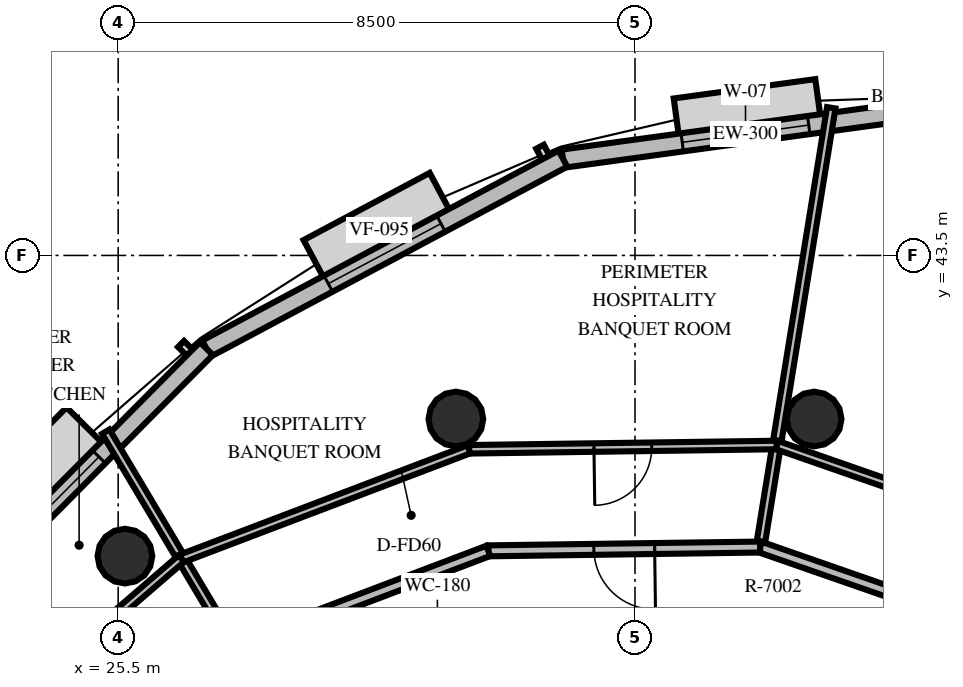
"""IFC4 building model, lengths in metres.
Left out: names, types, materials, properties, quantities, classifications, styles, units other than length and angle.
Written with IfcOpenShell. Run it as: python <this file> out.ifc"""

import sys

from ifc_helpers import new_model, si_unit, direction, frame, frame_2d, origin, origin_2d, place, context, subcontext, project, spatial, rectangle, circle, extrude, element, fill, save


model = new_model("IFC4")
c1 = context("Model", 3, precision=1e-05, world=origin(), true_north=direction((0.0, 1.0)))
c2 = subcontext(c1, "Body", "Model", "MODEL_VIEW")
j1 = project(units=[si_unit("LENGTHUNIT", "METRE"), si_unit("PLANEANGLEUNIT", "RADIAN")], contexts=[c1])
p1 = place(None, origin())
s1 = spatial("IfcSite", under=j1, at=p1, CompositionType="ELEMENT")
p2 = place(p1, origin())
s2 = spatial("IfcBuilding", under=s1, at=p2, CompositionType="ELEMENT")
p3 = place(p2, frame((0.0, 0.0, 280.8)))
s3 = spatial("IfcBuildingStorey", under=s2, at=p3, CompositionType="ELEMENT", Elevation=280.8)
for number, where, z_axis, x_axis in (
    (1, (36.946, 40.81, 0.0), (0.0, 0.0, 1.0), (1.0, 0.0, 0.0)),
    (2, (31.054, 40.81, 0.0), (0.0, 0.0, 1.0), (1.0, 0.0, 0.0)),
    (3, (25.611, 38.555, 0.0), (0.0, 0.0, 1.0), (1.0, 0.0, 0.0)),
):
    element("IfcColumn", number, at=place(p3, frame(where, z_axis=z_axis, x_axis=x_axis)), inside=s3, PredefinedType="COLUMN", context=c2, shape_type="SweptSolid", body=[
        extrude(circle(Radius=0.45, at=origin_2d()), origin(), (0.0, 0.0, 1.0), 3.6),
    ])
p4 = place(p3, frame((38.82, 45.912, 0.0), z_axis=(0.0, 0.0, 1.0), x_axis=(-0.99078452566, -0.135447494301, 0.0)))
e4 = element("IfcWall", 4, at=p4, inside=s3, PredefinedType="SOLIDWALL", context=c2, shape_type="SweptSolid", body=[
    extrude(rectangle(XDim=6.062, YDim=0.3, at=frame_2d((3.031, 0.0))), origin(), (0.0, 0.0, 1.0), 2.76),
])
p5 = place(p4, frame((1.981, 0.0, 0.8)))
e5 = element("IfcOpeningElement", 5, at=p5, cuts=e4, PredefinedType="OPENING", context=c2, shape_type="SweptSolid", body=[
    extrude(rectangle(XDim=2.1, YDim=1.85, at=frame_2d((1.05, 0.925))), frame((0.0, 0.16, 0.0), z_axis=(0.0, -1.0, 0.0), x_axis=(1.0, 0.0, 0.0)), (0.0, 0.0, 1.0), 0.32),
])
p6 = place(p3, frame((32.814, 45.091, 0.0), z_axis=(0.0, 0.0, 1.0), x_axis=(-0.882581737435, -0.470158990923, 0.0)))
e6 = element("IfcWall", 6, at=p6, inside=s3, PredefinedType="SOLIDWALL", context=c2, shape_type="SweptSolid", body=[
    extrude(rectangle(XDim=6.643, YDim=0.3, at=frame_2d((3.322, 0.0))), origin(), (0.0, 0.0, 1.0), 2.76),
])
p7 = place(p6, frame((2.272, 0.0, 0.8)))
e7 = element("IfcOpeningElement", 7, at=p7, cuts=e6, PredefinedType="OPENING", context=c2, shape_type="SweptSolid", body=[
    extrude(rectangle(XDim=2.1, YDim=1.85, at=frame_2d((1.05, 0.925))), frame((0.0, 0.16, 0.0), z_axis=(0.0, -1.0, 0.0), x_axis=(1.0, 0.0, 0.0)), (0.0, 0.0, 1.0), 0.32),
])
p8 = place(p3, frame((26.951, 41.968, 0.0), z_axis=(0.0, 0.0, 1.0), x_axis=(-0.704528696966, -0.709675499895, 0.0)))
e8 = element("IfcWall", 8, at=p8, inside=s3, PredefinedType="SOLIDWALL", context=c2, shape_type="SweptSolid", body=[
    extrude(rectangle(XDim=7.115, YDim=0.3, at=frame_2d((3.558, 0.0))), origin(), (0.0, 0.0, 1.0), 2.76),
])
p9 = place(p8, frame((2.508, 0.0, 0.8)))
e9 = element("IfcOpeningElement", 9, at=p9, cuts=e8, PredefinedType="OPENING", context=c2, shape_type="SweptSolid", body=[
    extrude(rectangle(XDim=2.1, YDim=1.85, at=frame_2d((1.05, 0.925))), frame((0.0, 0.16, 0.0), z_axis=(0.0, -1.0, 0.0), x_axis=(1.0, 0.0, 0.0)), (0.0, 0.0, 1.0), 0.32),
])
p10 = place(p3, frame((36.058, 38.704, 0.0), z_axis=(0.0, 0.0, 1.0), x_axis=(0.159896328627, 0.987133812657, 0.0)))
e10 = element("IfcWall", 10, at=p10, inside=s3, PredefinedType="PARTITIONING", context=c2, shape_type="SweptSolid", body=[
    extrude(rectangle(XDim=7.318, YDim=0.14, at=frame_2d((3.659, 0.0))), origin(), (0.0, 0.0, 1.0), 2.46),
])
p11 = place(p3, frame((40.279, 37.235, 0.0), z_axis=(0.0, 0.0, 1.0), x_axis=(-0.944393587755, 0.328817200595, 0.0)))
e11 = element("IfcWall", 11, at=p11, inside=s3, PredefinedType="PARTITIONING", context=c2, shape_type="SweptSolid", body=[
    extrude(rectangle(XDim=4.47, YDim=0.18, at=frame_2d((2.235, 0.0))), origin(), (0.0, 0.0, 1.0), 2.46),
])
p12 = place(p11, frame((0.942, 0.0, 0.0)))
e12 = element("IfcOpeningElement", 12, at=p12, cuts=e11, PredefinedType="OPENING", context=c2, shape_type="SweptSolid", body=[
    extrude(rectangle(XDim=1.0, YDim=2.15, at=frame_2d((0.5, 1.075))), frame((0.0, 0.1, 0.0), z_axis=(0.0, -1.0, 0.0), x_axis=(1.0, 0.0, 0.0)), (0.0, 0.0, 1.0), 0.2),
])
p13 = place(p3, frame((41.108, 38.719, 0.0), z_axis=(0.0, 0.0, 1.0), x_axis=(-0.944376965855, 0.328864936354, 0.0)))
e13 = element("IfcWall", 13, at=p13, inside=s3, PredefinedType="PARTITIONING", context=c2, shape_type="SweptSolid", body=[
    extrude(rectangle(XDim=5.06, YDim=0.14, at=frame_2d((2.53, 0.0))), origin(), (0.0, 0.0, 1.0), 2.46),
])
p14 = place(p13, frame((1.117, 0.0, 0.0)))
e14 = element("IfcOpeningElement", 14, at=p14, cuts=e13, PredefinedType="OPENING", context=c2, shape_type="SweptSolid", body=[
    extrude(rectangle(XDim=0.95, YDim=2.15, at=frame_2d((0.475, 1.075))), frame((0.0, 0.08, 0.0), z_axis=(0.0, -1.0, 0.0), x_axis=(1.0, 0.0, 0.0)), (0.0, 0.0, 1.0), 0.16),
])
p15 = place(p3, frame((27.41, 37.055, 0.0), z_axis=(0.0, 0.0, 1.0), x_axis=(-0.512015892625, 0.858975975042, 0.0)))
e15 = element("IfcWall", 15, at=p15, inside=s3, PredefinedType="PARTITIONING", context=c2, shape_type="SweptSolid", body=[
    extrude(rectangle(XDim=4.13, YDim=0.14, at=frame_2d((2.065, 0.0))), origin(), (0.0, 0.0, 1.0), 2.46),
])
p16 = place(p3, frame((36.058, 38.704, 0.0), z_axis=(0.0, 0.0, 1.0), x_axis=(-0.99990299363, -0.013928507778, 0.0)))
e16 = element("IfcWall", 16, at=p16, inside=s3, PredefinedType="PARTITIONING", context=c2, shape_type="SweptSolid", body=[
    extrude(rectangle(XDim=4.47, YDim=0.18, at=frame_2d((2.235, 0.0))), origin(), (0.0, 0.0, 1.0), 2.46),
])
p17 = place(p16, frame((1.735, 0.0, 0.0)))
e17 = element("IfcOpeningElement", 17, at=p17, cuts=e16, PredefinedType="OPENING", context=c2, shape_type="SweptSolid", body=[
    extrude(rectangle(XDim=1.0, YDim=2.15, at=frame_2d((0.5, 1.075))), frame((0.0, 0.1, 0.0), z_axis=(0.0, -1.0, 0.0), x_axis=(1.0, 0.0, 0.0)), (0.0, 0.0, 1.0), 0.2),
])
p18 = place(p3, frame((31.588, 38.642, 0.0), z_axis=(0.0, 0.0, 1.0), x_axis=(-0.934814409171, -0.355136622169, 0.0)))
e18 = element("IfcWall", 18, at=p18, inside=s3, PredefinedType="PARTITIONING", context=c2, shape_type="SweptSolid", body=[
    extrude(rectangle(XDim=4.47, YDim=0.18, at=frame_2d((2.235, 0.0))), origin(), (0.0, 0.0, 1.0), 2.46),
])
p19 = place(p3, frame((36.33, 40.383, 0.0), z_axis=(0.0, 0.0, 1.0), x_axis=(-0.999902780096, -0.013943828578, 0.0)))
e19 = element("IfcWall", 19, at=p19, inside=s3, PredefinedType="PARTITIONING", context=c2, shape_type="SweptSolid", body=[
    extrude(rectangle(XDim=5.06, YDim=0.14, at=frame_2d((2.53, 0.0))), origin(), (0.0, 0.0, 1.0), 2.46),
])
p20 = place(p19, frame((2.055, 0.0, 0.0)))
e20 = element("IfcOpeningElement", 20, at=p20, cuts=e19, PredefinedType="OPENING", context=c2, shape_type="SweptSolid", body=[
    extrude(rectangle(XDim=0.95, YDim=2.15, at=frame_2d((0.475, 1.075))), frame((0.0, 0.08, 0.0), z_axis=(0.0, -1.0, 0.0), x_axis=(1.0, 0.0, 0.0)), (0.0, 0.0, 1.0), 0.16),
])
p21 = place(p3, frame((31.27, 40.312, 0.0), z_axis=(0.0, 0.0, 1.0), x_axis=(-0.934813695118, -0.355138501743, 0.0)))
e21 = element("IfcWall", 21, at=p21, inside=s3, PredefinedType="PARTITIONING", context=c2, shape_type="SweptSolid", body=[
    extrude(rectangle(XDim=5.06, YDim=0.14, at=frame_2d((2.53, 0.0))), origin(), (0.0, 0.0, 1.0), 2.46),
])
p22 = place(p3, frame((26.54, 38.515, 0.0), z_axis=(0.0, 0.0, 1.0), x_axis=(-0.757024760465, -0.653386189051, 0.0)))
e22 = element("IfcWall", 22, at=p22, inside=s3, PredefinedType="PARTITIONING", context=c2, shape_type="SweptSolid", body=[
    extrude(rectangle(XDim=5.06, YDim=0.14, at=frame_2d((2.53, 0.0))), origin(), (0.0, 0.0, 1.0), 2.46),
])
p23 = place(p22, frame((2.992, 0.0, 0.0)))
e23 = element("IfcOpeningElement", 23, at=p23, cuts=e22, PredefinedType="OPENING", context=c2, shape_type="SweptSolid", body=[
    extrude(rectangle(XDim=0.95, YDim=2.15, at=frame_2d((0.475, 1.075))), frame((0.0, 0.08, 0.0), z_axis=(0.0, -1.0, 0.0), x_axis=(1.0, 0.0, 0.0)), (0.0, 0.0, 1.0), 0.16),
])
p24 = place(p5, origin())
e24 = element("IfcWindow", 24, at=p24, inside=s3, PartitioningType="SINGLE_PANEL", PredefinedType="WINDOW", context=c2, shape_type="SweptSolid", body=[
    extrude(rectangle(XDim=2.1, YDim=1.85, at=frame_2d((1.05, 0.925))), frame((0.0, 0.03, 0.0), z_axis=(0.0, -1.0, 0.0), x_axis=(1.0, 0.0, 0.0)), (0.0, 0.0, 1.0), 0.06),
])
fill(e5, e24)
p25 = place(p7, origin())
e25 = element("IfcWindow", 25, at=p25, inside=s3, PartitioningType="SINGLE_PANEL", PredefinedType="WINDOW", context=c2, shape_type="SweptSolid", body=[
    extrude(rectangle(XDim=2.1, YDim=1.85, at=frame_2d((1.05, 0.925))), frame((0.0, 0.03, 0.0), z_axis=(0.0, -1.0, 0.0), x_axis=(1.0, 0.0, 0.0)), (0.0, 0.0, 1.0), 0.06),
])
fill(e7, e25)
p26 = place(p9, origin())
e26 = element("IfcWindow", 26, at=p26, inside=s3, PartitioningType="SINGLE_PANEL", PredefinedType="WINDOW", context=c2, shape_type="SweptSolid", body=[
    extrude(rectangle(XDim=2.1, YDim=1.85, at=frame_2d((1.05, 0.925))), frame((0.0, 0.03, 0.0), z_axis=(0.0, -1.0, 0.0), x_axis=(1.0, 0.0, 0.0)), (0.0, 0.0, 1.0), 0.06),
])
fill(e9, e26)
p27 = place(p17, origin())
e27 = element("IfcDoor", 27, at=p27, inside=s3, OperationType="SINGLE_SWING_LEFT", PredefinedType="DOOR", context=c2, shape_type="SweptSolid", body=[
    extrude(rectangle(XDim=1.0, YDim=2.15, at=frame_2d((0.5, 1.075))), frame((0.0, 0.025, 0.0), z_axis=(0.0, -1.0, 0.0), x_axis=(1.0, 0.0, 0.0)), (0.0, 0.0, 1.0), 0.05),
])
fill(e17, e27)
p28 = place(p20, origin())
e28 = element("IfcDoor", 28, at=p28, inside=s3, OperationType="SINGLE_SWING_RIGHT", PredefinedType="DOOR", context=c2, shape_type="SweptSolid", body=[
    extrude(rectangle(XDim=0.95, YDim=2.15, at=frame_2d((0.475, 1.075))), frame((0.0, 0.025, 0.0), z_axis=(0.0, -1.0, 0.0), x_axis=(1.0, 0.0, 0.0)), (0.0, 0.0, 1.0), 0.05),
])
fill(e20, e28)
save(model, sys.argv[1])
